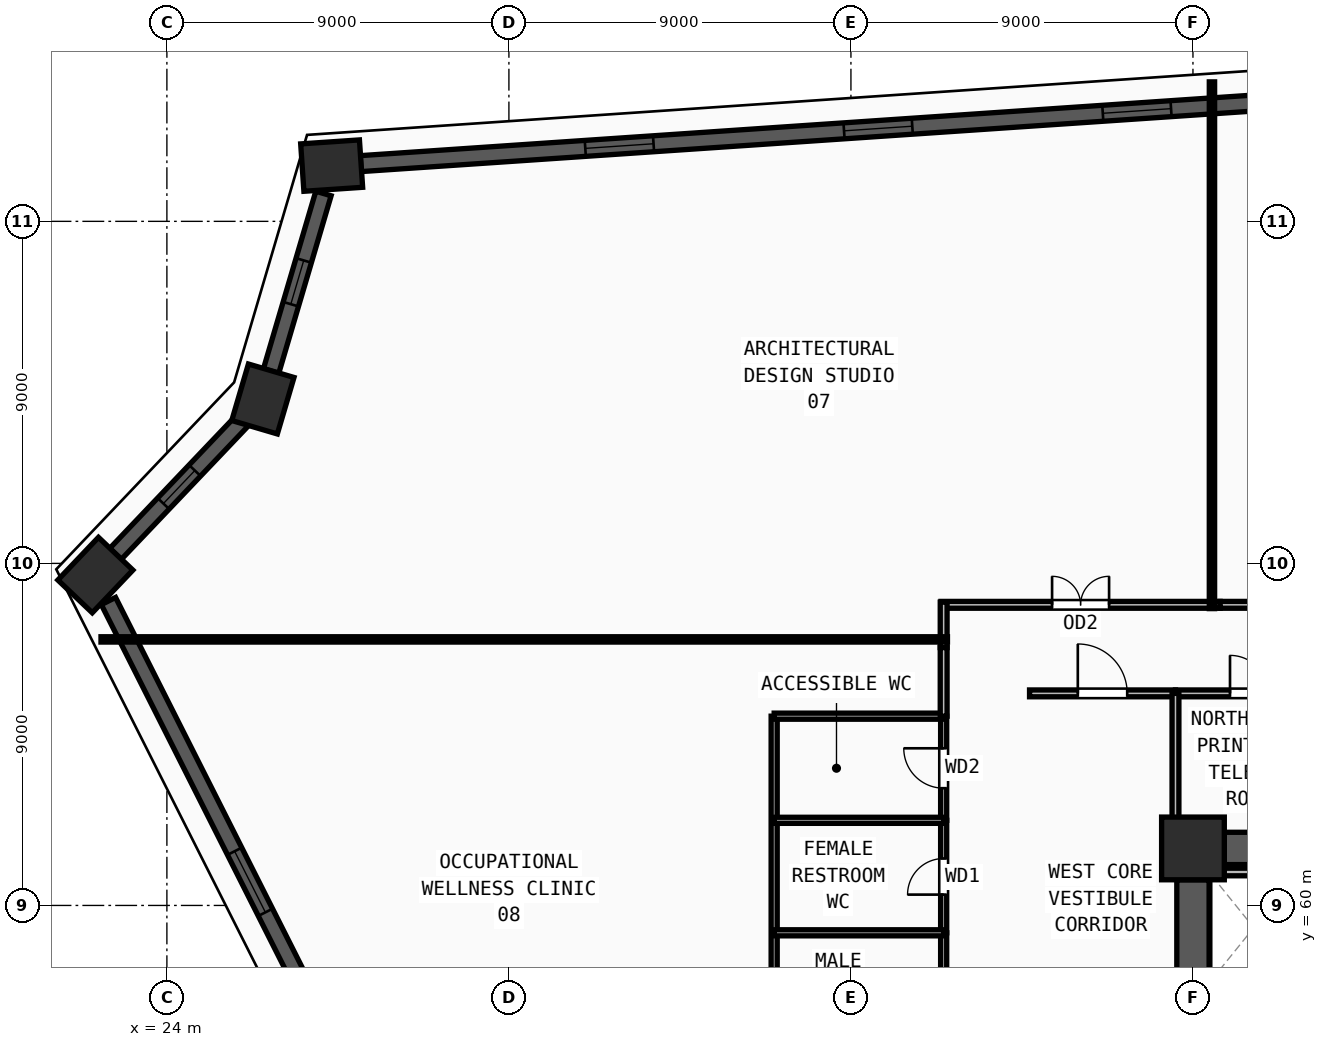
"""IFC4 building model, lengths in metres.
Left out: names, types, materials, properties, quantities, classifications, styles, units other than length and angle.
Written with IfcOpenShell. Run it as: python <this file> out.ifc"""

import sys

from ifc_helpers import new_model, si_unit, direction, frame, frame_2d, origin, origin_2d, place, context, subcontext, project, spatial, rectangle, extrude, source, transform, mapped, element, fill, save


model = new_model("IFC4")
c1 = context("Model", 3, precision=1e-05, world=origin(), true_north=direction((0.0, 1.0)))
c2 = subcontext(c1, "Body", "Model", "MODEL_VIEW")
j1 = project(units=[si_unit("LENGTHUNIT", "METRE"), si_unit("PLANEANGLEUNIT", "RADIAN")], contexts=[c1])
p1 = place(None, origin())
s1 = spatial("IfcSite", under=j1, at=p1, CompositionType="ELEMENT")
p2 = place(p1, origin())
s2 = spatial("IfcBuilding", under=s1, at=p2, CompositionType="ELEMENT")
p3 = place(p2, frame((0.0, 0.0, 74.25)))
s3 = spatial("IfcBuildingStorey", under=s2, at=p3, CompositionType="ELEMENT", Elevation=74.25)
m1 = source(origin(), c2, "Body", "SweptSolid", [
    extrude(rectangle(XDim=1.65, YDim=1.65, at=origin_2d()), origin(), (0.0, 0.0, 1.0), 3.75),
])
p4 = place(p3, frame((51.0, 61.5, 0.0), z_axis=(0.0, 0.0, 1.0), x_axis=(1.0, 0.0, 0.0)))
e1 = element("IfcColumn", 1, at=p4, inside=s3, PredefinedType="COLUMN", context=c2, shape_type="MappedRepresentation", body=[
    mapped(m1, transform((0.0, 0.0, 0.0), x_axis=(1.0, 0.0, 0.0), y_axis=(0.0, 1.0, 0.0), z_axis=(0.0, 0.0, 1.0), scale=1.0)),
])
m2 = source(origin(), c2, "Body", "SweptSolid", [
    extrude(rectangle(XDim=1.55, YDim=1.25, at=origin_2d()), origin(), (0.0, 0.0, 1.0), 3.75),
])
for number, where, z_axis, x_axis in (
    (2, (22.118, 68.693, 0.0), (0.0, 0.0, 1.0), (0.689, 0.724, 0.0)),
    (3, (26.526, 73.326, 0.0), (0.0, 0.0, 1.0), (0.283, 0.959, 0.0)),
    (4, (28.336, 79.467, 0.0), (0.0, 0.0, 1.0), (0.998, 0.068, 0.0)),
):
    element("IfcColumn", number, at=place(p3, frame(where, z_axis=z_axis, x_axis=x_axis)), inside=s3, PredefinedType="COLUMN", context=c2, shape_type="MappedRepresentation", body=[
        mapped(m2, transform((0.0, 0.0, 0.0), x_axis=(1.0, 0.0, 0.0), y_axis=(0.0, 1.0, 0.0), z_axis=(0.0, 0.0, 1.0), scale=1.0)),
    ])
p5 = place(p3, frame((56.334, 81.366, 0.0), z_axis=(0.0, 0.0, 1.0), x_axis=(-0.997708484566, -0.067659292233, 0.0)))
e5 = element("IfcWall", 5, at=p5, inside=s3, PredefinedType="SOLIDWALL", context=c2, shape_type="SweptSolid", body=[
    extrude(rectangle(XDim=27.297, YDim=0.42, at=frame_2d((13.649, 0.0))), origin(), (0.0, 0.0, 1.0), 3.57),
])
m3 = source(origin(), c2, "Body", "SweptSolid", [
    extrude(rectangle(XDim=1.8, YDim=1.95, at=frame_2d((0.9, 0.975))), frame((0.0, 0.22, 0.0), z_axis=(0.0, -1.0, 0.0), x_axis=(1.0, 0.0, 0.0)), (0.0, 0.0, 1.0), 0.44),
])
p6 = place(p5, frame((5.924, 0.0, 0.55)))
e6 = element("IfcOpeningElement", 6, at=p6, cuts=e5, PredefinedType="OPENING", context=c2, shape_type="MappedRepresentation", body=[
    mapped(m3, transform((0.0, 0.0, 0.0), x_axis=(1.0, 0.0, 0.0), y_axis=(0.0, 1.0, 0.0), z_axis=(0.0, 0.0, 1.0), scale=1.0)),
])
p7 = place(p5, frame((12.749, 0.0, 0.55)))
e7 = element("IfcOpeningElement", 7, at=p7, cuts=e5, PredefinedType="OPENING", context=c2, shape_type="MappedRepresentation", body=[
    mapped(m3, transform((0.0, 0.0, 0.0), x_axis=(1.0, 0.0, 0.0), y_axis=(0.0, 1.0, 0.0), z_axis=(0.0, 0.0, 1.0), scale=1.0)),
])
p8 = place(p5, frame((19.573, 0.0, 0.55)))
e8 = element("IfcOpeningElement", 8, at=p8, cuts=e5, PredefinedType="OPENING", context=c2, shape_type="MappedRepresentation", body=[
    mapped(m3, transform((0.0, 0.0, 0.0), x_axis=(1.0, 0.0, 0.0), y_axis=(0.0, 1.0, 0.0), z_axis=(0.0, 0.0, 1.0), scale=1.0)),
])
p9 = place(p3, frame((28.12, 78.733, 0.0), z_axis=(0.0, 0.0, 1.0), x_axis=(-0.282885215884, -0.959153770067, 0.0)))
e9 = element("IfcWall", 9, at=p9, inside=s3, PredefinedType="SOLIDWALL", context=c2, shape_type="SweptSolid", body=[
    extrude(rectangle(XDim=4.872, YDim=0.42, at=frame_2d((2.436, 0.0))), origin(), (0.0, 0.0, 1.0), 3.57),
])
m4 = source(origin(), c2, "Body", "SweptSolid", [
    extrude(rectangle(XDim=1.2, YDim=1.9, at=frame_2d((0.6, 0.95))), frame((0.0, 0.22, 0.0), z_axis=(0.0, -1.0, 0.0), x_axis=(1.0, 0.0, 0.0)), (0.0, 0.0, 1.0), 0.44),
])
p10 = place(p9, frame((1.836, 0.0, 0.55)))
e10 = element("IfcOpeningElement", 10, at=p10, cuts=e9, PredefinedType="OPENING", context=c2, shape_type="MappedRepresentation", body=[
    mapped(m4, transform((0.0, 0.0, 0.0), x_axis=(1.0, 0.0, 0.0), y_axis=(0.0, 1.0, 0.0), z_axis=(0.0, 0.0, 1.0), scale=1.0)),
])
p11 = place(p3, frame((25.999, 72.772, 0.0), z_axis=(0.0, 0.0, 1.0), x_axis=(-0.689326835279, -0.724450491175, 0.0)))
e11 = element("IfcWall", 11, at=p11, inside=s3, PredefinedType="SOLIDWALL", context=c2, shape_type="SweptSolid", body=[
    extrude(rectangle(XDim=4.866, YDim=0.42, at=frame_2d((2.433, 0.0))), origin(), (0.0, 0.0, 1.0), 3.57),
])
p12 = place(p11, frame((1.833, 0.0, 0.55)))
e12 = element("IfcOpeningElement", 12, at=p12, cuts=e11, PredefinedType="OPENING", context=c2, shape_type="MappedRepresentation", body=[
    mapped(m4, transform((0.0, 0.0, 0.0), x_axis=(1.0, 0.0, 0.0), y_axis=(0.0, 1.0, 0.0), z_axis=(0.0, 0.0, 1.0), scale=1.0)),
])
p13 = place(p3, frame((22.462, 68.01, 0.0), z_axis=(0.0, 0.0, 1.0), x_axis=(0.450259201953, -0.89289789509, 0.0)))
e13 = element("IfcWall", 13, at=p13, inside=s3, PredefinedType="SOLIDWALL", context=c2, shape_type="SweptSolid", body=[
    extrude(rectangle(XDim=33.094, YDim=0.42, at=frame_2d((16.547, 0.0))), origin(), (0.0, 0.0, 1.0), 3.57),
])
p14 = place(p13, frame((7.374, 0.0, 0.55)))
e14 = element("IfcOpeningElement", 14, at=p14, cuts=e13, PredefinedType="OPENING", context=c2, shape_type="MappedRepresentation", body=[
    mapped(m3, transform((0.0, 0.0, 0.0), x_axis=(1.0, 0.0, 0.0), y_axis=(0.0, 1.0, 0.0), z_axis=(0.0, 0.0, 1.0), scale=1.0)),
])
p15 = place(p13, frame((17.197, 0.0, 0.55)))
e15 = element("IfcOpeningElement", 15, at=p15, cuts=e13, PredefinedType="OPENING", context=c2, shape_type="MappedRepresentation", body=[
    mapped(m3, transform((0.0, 0.0, 0.0), x_axis=(1.0, 0.0, 0.0), y_axis=(0.0, 1.0, 0.0), z_axis=(0.0, 0.0, 1.0), scale=1.0)),
])
p16 = place(p13, frame((23.071, 0.0, 0.55)))
e16 = element("IfcOpeningElement", 16, at=p16, cuts=e13, PredefinedType="OPENING", context=c2, shape_type="MappedRepresentation", body=[
    mapped(m3, transform((0.0, 0.0, 0.0), x_axis=(1.0, 0.0, 0.0), y_axis=(0.0, 1.0, 0.0), z_axis=(0.0, 0.0, 1.0), scale=1.0)),
])
p17 = place(p3, frame((51.825, 61.5, 0.0), z_axis=(0.0, 0.0, 1.0), x_axis=(1.0, 0.0, 0.0)))
e17 = element("IfcWall", 17, at=p17, inside=s3, PredefinedType="SHEAR", context=c2, shape_type="SweptSolid", body=[
    extrude(rectangle(XDim=7.35, YDim=0.85, at=frame_2d((3.675, 0.0))), origin(), (0.0, 0.0, 1.0), 3.57),
])
p18 = place(p3, frame((51.0, 47.325, 0.0), z_axis=(0.0, 0.0, 1.0), x_axis=(0.0, 1.0, 0.0)))
e18 = element("IfcWall", 18, at=p18, inside=s3, PredefinedType="SHEAR", context=c2, shape_type="SweptSolid", body=[
    extrude(rectangle(XDim=13.35, YDim=0.85, at=frame_2d((6.675, 0.0))), origin(), (0.0, 0.0, 1.0), 3.57),
])
p19 = place(p3, frame((53.8, 60.88, 0.0), z_axis=(0.0, 0.0, 1.0), x_axis=(-1.0, 0.0, 0.0)))
e19 = element("IfcWall", 19, at=p19, inside=s3, PredefinedType="SOLIDWALL", context=c2, shape_type="SweptSolid", body=[
    extrude(rectangle(XDim=2.4, YDim=0.2, at=frame_2d((1.2, 0.0))), origin(), (0.0, 0.0, 1.0), 3.57),
])
p20 = place(p3, frame((44.44, 56.34, 0.0), z_axis=(0.0, 0.0, 1.0), x_axis=(0.0, 1.0, 0.0)))
e20 = element("IfcWall", 20, at=p20, inside=s3, PredefinedType="PARTITIONING", context=c2, shape_type="SweptSolid", body=[
    extrude(rectangle(XDim=2.94, YDim=0.16, at=frame_2d((1.47, 0.0))), origin(), (0.0, 0.0, 1.0), 3.57),
])
m5 = source(origin(), c2, "Body", "SweptSolid", [
    extrude(rectangle(XDim=0.95, YDim=2.15, at=frame_2d((0.475, 1.075))), frame((0.0, 0.09, 0.0), z_axis=(0.0, -1.0, 0.0), x_axis=(1.0, 0.0, 0.0)), (0.0, 0.0, 1.0), 0.18),
])
p21 = place(p20, frame((0.995, 0.0, 0.0)))
e21 = element("IfcOpeningElement", 21, at=p21, cuts=e20, PredefinedType="OPENING", context=c2, shape_type="MappedRepresentation", body=[
    mapped(m5, transform((0.0, 0.0, 0.0), x_axis=(1.0, 0.0, 0.0), y_axis=(0.0, 1.0, 0.0), z_axis=(0.0, 0.0, 1.0), scale=1.0)),
])
p22 = place(p3, frame((44.44, 59.28, 0.0), z_axis=(0.0, 0.0, 1.0), x_axis=(0.0, 1.0, 0.0)))
e22 = element("IfcWall", 22, at=p22, inside=s3, PredefinedType="PARTITIONING", context=c2, shape_type="SweptSolid", body=[
    extrude(rectangle(XDim=2.96, YDim=0.16, at=frame_2d((1.48, 0.0))), origin(), (0.0, 0.0, 1.0), 3.57),
])
p23 = place(p22, frame((1.005, 0.0, 0.0)))
e23 = element("IfcOpeningElement", 23, at=p23, cuts=e22, PredefinedType="OPENING", context=c2, shape_type="MappedRepresentation", body=[
    mapped(m5, transform((0.0, 0.0, 0.0), x_axis=(1.0, 0.0, 0.0), y_axis=(0.0, 1.0, 0.0), z_axis=(0.0, 0.0, 1.0), scale=1.0)),
])
p24 = place(p3, frame((44.44, 62.24, 0.0), z_axis=(0.0, 0.0, 1.0), x_axis=(0.0, 1.0, 0.0)))
e24 = element("IfcWall", 24, at=p24, inside=s3, PredefinedType="PARTITIONING", context=c2, shape_type="SweptSolid", body=[
    extrude(rectangle(XDim=2.74, YDim=0.16, at=frame_2d((1.37, 0.0))), origin(), (0.0, 0.0, 1.0), 3.57),
])
m6 = source(origin(), c2, "Body", "SweptSolid", [
    extrude(rectangle(XDim=1.05, YDim=2.15, at=frame_2d((0.525, 1.075))), frame((0.0, 0.09, 0.0), z_axis=(0.0, -1.0, 0.0), x_axis=(1.0, 0.0, 0.0)), (0.0, 0.0, 1.0), 0.18),
])
p25 = place(p24, frame((0.845, 0.0, 0.0)))
e25 = element("IfcOpeningElement", 25, at=p25, cuts=e24, PredefinedType="OPENING", context=c2, shape_type="MappedRepresentation", body=[
    mapped(m6, transform((0.0, 0.0, 0.0), x_axis=(1.0, 0.0, 0.0), y_axis=(0.0, 1.0, 0.0), z_axis=(0.0, 0.0, 1.0), scale=1.0)),
])
p26 = place(p3, frame((50.54, 65.58, 0.0), z_axis=(0.0, 0.0, 1.0), x_axis=(1.0, 0.0, 0.0)))
e26 = element("IfcWall", 26, at=p26, inside=s3, PredefinedType="PARTITIONING", context=c2, shape_type="SweptSolid", body=[
    extrude(rectangle(XDim=3.87, YDim=0.18, at=frame_2d((1.935, 0.0))), origin(), (0.0, 0.0, 1.0), 3.57),
])
m7 = source(origin(), c2, "Body", "SweptSolid", [
    extrude(rectangle(XDim=1.0, YDim=2.2, at=frame_2d((0.5, 1.1))), frame((0.0, 0.1, 0.0), z_axis=(0.0, -1.0, 0.0), x_axis=(1.0, 0.0, 0.0)), (0.0, 0.0, 1.0), 0.2),
])
p27 = place(p26, frame((1.435, 0.0, 0.0)))
e27 = element("IfcOpeningElement", 27, at=p27, cuts=e26, PredefinedType="OPENING", context=c2, shape_type="MappedRepresentation", body=[
    mapped(m7, transform((0.0, 0.0, 0.0), x_axis=(1.0, 0.0, 0.0), y_axis=(0.0, 1.0, 0.0), z_axis=(0.0, 0.0, 1.0), scale=1.0)),
])
p28 = place(p3, frame((46.7, 65.58, 0.0), z_axis=(0.0, 0.0, 1.0), x_axis=(1.0, 0.0, 0.0)))
e28 = element("IfcWall", 28, at=p28, inside=s3, PredefinedType="PARTITIONING", context=c2, shape_type="SweptSolid", body=[
    extrude(rectangle(XDim=3.84, YDim=0.18, at=frame_2d((1.92, 0.0))), origin(), (0.0, 0.0, 1.0), 3.57),
])
m8 = source(origin(), c2, "Body", "SweptSolid", [
    extrude(rectangle(XDim=1.3, YDim=2.2, at=frame_2d((0.65, 1.1))), frame((0.0, 0.1, 0.0), z_axis=(0.0, -1.0, 0.0), x_axis=(1.0, 0.0, 0.0)), (0.0, 0.0, 1.0), 0.2),
])
p29 = place(p28, frame((1.27, 0.0, 0.0)))
e29 = element("IfcOpeningElement", 29, at=p29, cuts=e28, PredefinedType="OPENING", context=c2, shape_type="MappedRepresentation", body=[
    mapped(m8, transform((0.0, 0.0, 0.0), x_axis=(1.0, 0.0, 0.0), y_axis=(0.0, 1.0, 0.0), z_axis=(0.0, 0.0, 1.0), scale=1.0)),
])
p30 = place(p3, frame((44.37, 67.91, 0.0), z_axis=(0.0, 0.0, 1.0), x_axis=(1.0, 0.0, 0.0)))
e30 = element("IfcWall", 30, at=p30, inside=s3, PredefinedType="PARTITIONING", context=c2, shape_type="SweptSolid", body=[
    extrude(rectangle(XDim=7.345, YDim=0.18, at=frame_2d((3.672, 0.0))), origin(), (0.0, 0.0, 1.0), 3.57),
])
m9 = source(origin(), c2, "Body", "SweptSolid", [
    extrude(rectangle(XDim=1.5, YDim=2.2, at=frame_2d((0.75, 1.1))), frame((0.0, 0.1, 0.0), z_axis=(0.0, -1.0, 0.0), x_axis=(1.0, 0.0, 0.0)), (0.0, 0.0, 1.0), 0.2),
])
p31 = place(p30, frame((2.923, 0.0, 0.0)))
e31 = element("IfcOpeningElement", 31, at=p31, cuts=e30, PredefinedType="OPENING", context=c2, shape_type="MappedRepresentation", body=[
    mapped(m9, transform((0.0, 0.0, 0.0), x_axis=(1.0, 0.0, 0.0), y_axis=(0.0, 1.0, 0.0), z_axis=(0.0, 0.0, 1.0), scale=1.0)),
])
p32 = place(p3, frame((39.98, 56.34, 0.0), z_axis=(0.0, 0.0, 1.0), x_axis=(0.0, 1.0, 0.0)))
e32 = element("IfcWall", 32, at=p32, inside=s3, PredefinedType="PARTITIONING", context=c2, shape_type="SweptSolid", body=[
    extrude(rectangle(XDim=8.64, YDim=0.16, at=frame_2d((4.32, 0.0))), origin(), (0.0, 0.0, 1.0), 3.57),
])
for number, where, z_axis, x_axis in (
    (33, (39.98, 59.28, 0.0), (0.0, 0.0, 1.0), (1.0, 0.0, 0.0)),
    (34, (39.98, 62.24, 0.0), (0.0, 0.0, 1.0), (1.0, 0.0, 0.0)),
    (35, (39.98, 64.98, 0.0), (0.0, 0.0, 1.0), (1.0, 0.0, 0.0)),
):
    element("IfcWall", number, at=place(p3, frame(where, z_axis=z_axis, x_axis=x_axis)), inside=s3, PredefinedType="PARTITIONING", context=c2, shape_type="SweptSolid", body=[
        extrude(rectangle(XDim=4.46, YDim=0.16, at=frame_2d((2.23, 0.0))), origin(), (0.0, 0.0, 1.0), 3.57),
    ])
p33 = place(p3, frame((50.54, 61.95, 0.0), z_axis=(0.0, 0.0, 1.0), x_axis=(0.0, 1.0, 0.0)))
e36 = element("IfcWall", 36, at=p33, inside=s3, PredefinedType="PARTITIONING", context=c2, shape_type="SweptSolid", body=[
    extrude(rectangle(XDim=3.63, YDim=0.18, at=frame_2d((1.815, 0.0))), origin(), (0.0, 0.0, 1.0), 3.57),
])
p34 = place(p3, frame((51.715, 67.91, 0.0), z_axis=(0.0, 0.0, 1.0), x_axis=(1.0, 0.0, 0.0)))
e37 = element("IfcWall", 37, at=p34, inside=s3, PredefinedType="PARTITIONING", context=c2, shape_type="SweptSolid", body=[
    extrude(rectangle(XDim=7.195, YDim=0.18, at=frame_2d((3.597, 0.0))), origin(), (0.0, 0.0, 1.0), 3.57),
])
p35 = place(p3, frame((44.44, 66.785, 0.0), z_axis=(0.0, 0.0, 1.0), x_axis=(0.0, 1.0, 0.0)))
e38 = element("IfcWall", 38, at=p35, inside=s3, PredefinedType="PARTITIONING", context=c2, shape_type="SweptSolid", body=[
    extrude(rectangle(XDim=1.195, YDim=0.18, at=frame_2d((0.598, 0.0))), origin(), (0.0, 0.0, 1.0), 3.57),
])
p36 = place(p3, frame((44.44, 64.98, 0.0), z_axis=(0.0, 0.0, 1.0), x_axis=(0.0, 1.0, 0.0)))
e39 = element("IfcWall", 39, at=p36, inside=s3, PredefinedType="PARTITIONING", context=c2, shape_type="SweptSolid", body=[
    extrude(rectangle(XDim=1.805, YDim=0.18, at=frame_2d((0.902, 0.0))), origin(), (0.0, 0.0, 1.0), 3.57),
])
p37 = place(p3, frame((44.54, 67.0, 0.0), z_axis=(0.0, 0.0, 1.0), x_axis=(-1.0, 0.0, 0.0)))
e40 = element("IfcWall", 40, at=p37, inside=s3, PredefinedType="PARTITIONING", context=c2, shape_type="SweptSolid", body=[
    extrude(rectangle(XDim=22.274, YDim=0.14, at=frame_2d((11.137, 0.0))), origin(), (0.0, 0.0, 1.0), 2.655),
])
p38 = place(p3, frame((51.5, 67.81, 0.0), z_axis=(0.0, 0.0, 1.0), x_axis=(0.0, 1.0, 0.0)))
e41 = element("IfcWall", 41, at=p38, inside=s3, PredefinedType="PARTITIONING", context=c2, shape_type="SweptSolid", body=[
    extrude(rectangle(XDim=13.86, YDim=0.14, at=frame_2d((6.93, 0.0))), origin(), (0.0, 0.0, 1.0), 3.57),
])
m10 = source(origin(), c2, "Body", "SweptSolid", [
    extrude(rectangle(XDim=1.8, YDim=1.95, at=frame_2d((0.9, 0.975))), frame((0.0, 0.03, 0.0), z_axis=(0.0, -1.0, 0.0), x_axis=(1.0, 0.0, 0.0)), (0.0, 0.0, 1.0), 0.06),
])
p39 = place(p6, origin())
e42 = element("IfcWindow", 42, at=p39, inside=s3, PartitioningType="DOUBLE_PANEL_VERTICAL", PredefinedType="WINDOW", context=c2, shape_type="MappedRepresentation", body=[
    mapped(m10, transform((0.0, 0.0, 0.0), x_axis=(1.0, 0.0, 0.0), y_axis=(0.0, 1.0, 0.0), z_axis=(0.0, 0.0, 1.0), scale=1.0)),
])
fill(e6, e42)
p40 = place(p7, origin())
e43 = element("IfcWindow", 43, at=p40, inside=s3, PartitioningType="DOUBLE_PANEL_VERTICAL", PredefinedType="WINDOW", context=c2, shape_type="MappedRepresentation", body=[
    mapped(m10, transform((0.0, 0.0, 0.0), x_axis=(1.0, 0.0, 0.0), y_axis=(0.0, 1.0, 0.0), z_axis=(0.0, 0.0, 1.0), scale=1.0)),
])
fill(e7, e43)
p41 = place(p8, origin())
e44 = element("IfcWindow", 44, at=p41, inside=s3, PartitioningType="DOUBLE_PANEL_VERTICAL", PredefinedType="WINDOW", context=c2, shape_type="MappedRepresentation", body=[
    mapped(m10, transform((0.0, 0.0, 0.0), x_axis=(1.0, 0.0, 0.0), y_axis=(0.0, 1.0, 0.0), z_axis=(0.0, 0.0, 1.0), scale=1.0)),
])
fill(e8, e44)
m11 = source(origin(), c2, "Body", "SweptSolid", [
    extrude(rectangle(XDim=1.2, YDim=1.9, at=frame_2d((0.6, 0.95))), frame((0.0, 0.03, 0.0), z_axis=(0.0, -1.0, 0.0), x_axis=(1.0, 0.0, 0.0)), (0.0, 0.0, 1.0), 0.06),
])
p42 = place(p10, origin())
e45 = element("IfcWindow", 45, at=p42, inside=s3, PartitioningType="SINGLE_PANEL", PredefinedType="WINDOW", context=c2, shape_type="MappedRepresentation", body=[
    mapped(m11, transform((0.0, 0.0, 0.0), x_axis=(1.0, 0.0, 0.0), y_axis=(0.0, 1.0, 0.0), z_axis=(0.0, 0.0, 1.0), scale=1.0)),
])
fill(e10, e45)
p43 = place(p12, origin())
e46 = element("IfcWindow", 46, at=p43, inside=s3, PartitioningType="SINGLE_PANEL", PredefinedType="WINDOW", context=c2, shape_type="MappedRepresentation", body=[
    mapped(m11, transform((0.0, 0.0, 0.0), x_axis=(1.0, 0.0, 0.0), y_axis=(0.0, 1.0, 0.0), z_axis=(0.0, 0.0, 1.0), scale=1.0)),
])
fill(e12, e46)
p44 = place(p14, origin())
e47 = element("IfcWindow", 47, at=p44, inside=s3, PartitioningType="DOUBLE_PANEL_VERTICAL", PredefinedType="WINDOW", context=c2, shape_type="MappedRepresentation", body=[
    mapped(m10, transform((0.0, 0.0, 0.0), x_axis=(1.0, 0.0, 0.0), y_axis=(0.0, 1.0, 0.0), z_axis=(0.0, 0.0, 1.0), scale=1.0)),
])
fill(e14, e47)
m12 = source(origin(), c2, "Body", "SweptSolid", [
    extrude(rectangle(XDim=0.95, YDim=2.15, at=frame_2d((0.475, 1.075))), frame((0.0, 0.025, 0.0), z_axis=(0.0, -1.0, 0.0), x_axis=(1.0, 0.0, 0.0)), (0.0, 0.0, 1.0), 0.05),
])
p45 = place(p23, origin())
e48 = element("IfcDoor", 48, at=p45, inside=s3, OperationType="SINGLE_SWING_LEFT", PredefinedType="DOOR", context=c2, shape_type="MappedRepresentation", body=[
    mapped(m12, transform((0.0, 0.0, 0.0), x_axis=(1.0, 0.0, 0.0), y_axis=(0.0, 1.0, 0.0), z_axis=(0.0, 0.0, 1.0), scale=1.0)),
])
fill(e23, e48)
m13 = source(origin(), c2, "Body", "SweptSolid", [
    extrude(rectangle(XDim=1.05, YDim=2.15, at=frame_2d((0.525, 1.075))), frame((0.0, 0.025, 0.0), z_axis=(0.0, -1.0, 0.0), x_axis=(1.0, 0.0, 0.0)), (0.0, 0.0, 1.0), 0.05),
])
p46 = place(p25, origin())
e49 = element("IfcDoor", 49, at=p46, inside=s3, OperationType="SINGLE_SWING_RIGHT", PredefinedType="DOOR", context=c2, shape_type="MappedRepresentation", body=[
    mapped(m13, transform((0.0, 0.0, 0.0), x_axis=(1.0, 0.0, 0.0), y_axis=(0.0, 1.0, 0.0), z_axis=(0.0, 0.0, 1.0), scale=1.0)),
])
fill(e25, e49)
m14 = source(origin(), c2, "Body", "SweptSolid", [
    extrude(rectangle(XDim=1.0, YDim=2.2, at=frame_2d((0.5, 1.1))), frame((0.0, 0.025, 0.0), z_axis=(0.0, -1.0, 0.0), x_axis=(1.0, 0.0, 0.0)), (0.0, 0.0, 1.0), 0.05),
])
p47 = place(p27, origin())
e50 = element("IfcDoor", 50, at=p47, inside=s3, OperationType="SINGLE_SWING_LEFT", PredefinedType="DOOR", context=c2, shape_type="MappedRepresentation", body=[
    mapped(m14, transform((0.0, 0.0, 0.0), x_axis=(1.0, 0.0, 0.0), y_axis=(0.0, 1.0, 0.0), z_axis=(0.0, 0.0, 1.0), scale=1.0)),
])
fill(e27, e50)
m15 = source(origin(), c2, "Body", "SweptSolid", [
    extrude(rectangle(XDim=1.3, YDim=2.2, at=frame_2d((0.65, 1.1))), frame((0.0, 0.025, 0.0), z_axis=(0.0, -1.0, 0.0), x_axis=(1.0, 0.0, 0.0)), (0.0, 0.0, 1.0), 0.05),
])
p48 = place(p29, origin())
e51 = element("IfcDoor", 51, at=p48, inside=s3, OperationType="SINGLE_SWING_LEFT", PredefinedType="DOOR", context=c2, shape_type="MappedRepresentation", body=[
    mapped(m15, transform((0.0, 0.0, 0.0), x_axis=(1.0, 0.0, 0.0), y_axis=(0.0, 1.0, 0.0), z_axis=(0.0, 0.0, 1.0), scale=1.0)),
])
fill(e29, e51)
m16 = source(origin(), c2, "Body", "SweptSolid", [
    extrude(rectangle(XDim=1.5, YDim=2.2, at=frame_2d((0.75, 1.1))), frame((0.0, 0.025, 0.0), z_axis=(0.0, -1.0, 0.0), x_axis=(1.0, 0.0, 0.0)), (0.0, 0.0, 1.0), 0.05),
])
p49 = place(p31, origin())
e52 = element("IfcDoor", 52, at=p49, inside=s3, OperationType="DOUBLE_DOOR_SINGLE_SWING", PredefinedType="DOOR", context=c2, shape_type="MappedRepresentation", body=[
    mapped(m16, transform((0.0, 0.0, 0.0), x_axis=(1.0, 0.0, 0.0), y_axis=(0.0, 1.0, 0.0), z_axis=(0.0, 0.0, 1.0), scale=1.0)),
])
fill(e31, e52)
save(model, sys.argv[1])
